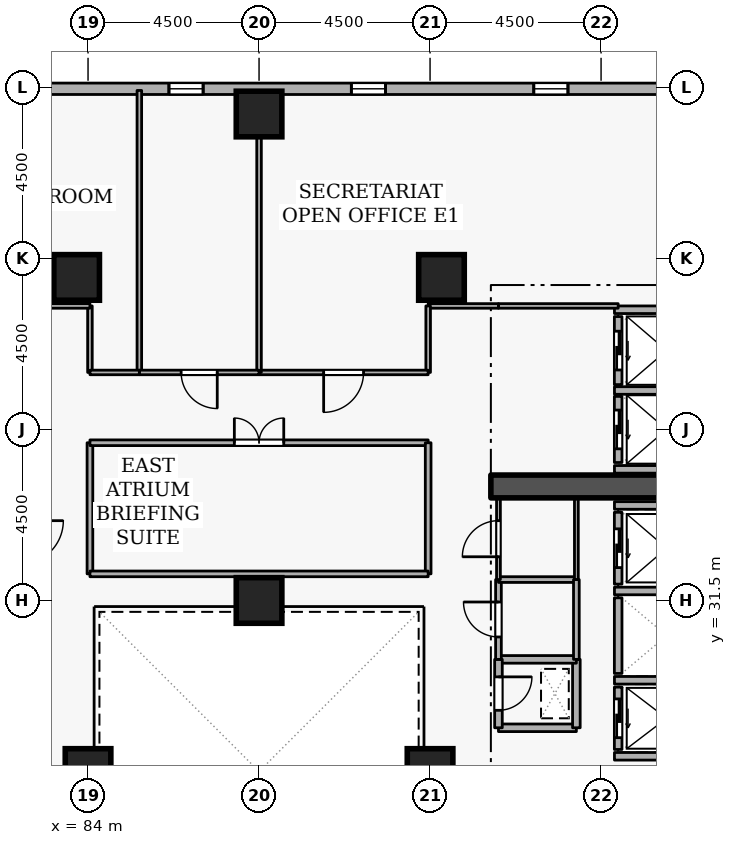
"""IFC4 building model, lengths in metres.
Left out: names, types, materials, properties, quantities, classifications, styles, units other than length and angle.
Written with IfcOpenShell. Run it as: python <this file> out.ifc"""

import sys

from ifc_helpers import new_model, si_unit, direction, frame, frame_2d, origin, origin_2d, place, context, subcontext, project, spatial, rectangle, extrude, element, fill, save


model = new_model("IFC4")
c1 = context("Model", 3, precision=1e-05, world=origin(), true_north=direction((0.0, 1.0)))
c2 = subcontext(c1, "Body", "Model", "MODEL_VIEW")
j1 = project(units=[si_unit("LENGTHUNIT", "METRE"), si_unit("PLANEANGLEUNIT", "RADIAN")], contexts=[c1])
p1 = place(None, origin())
s1 = spatial("IfcSite", under=j1, at=p1, CompositionType="ELEMENT")
p2 = place(p1, origin())
s2 = spatial("IfcBuilding", under=s1, at=p2, CompositionType="ELEMENT")
p3 = place(p2, frame((0.0, 0.0, 108.9)))
s3 = spatial("IfcBuildingStorey", under=s2, at=p3, CompositionType="ELEMENT", Elevation=108.9)
p4 = place(p3, frame((94.6, 34.5, 0.0), z_axis=(0.0, 0.0, 1.0), x_axis=(1.0, 0.0, 0.0)))
e1 = element("IfcWall", 1, at=p4, inside=s3, PredefinedType="SHEAR", context=c2, shape_type="SweptSolid", body=[
    extrude(rectangle(XDim=5.7, YDim=0.6, at=frame_2d((2.85, 0.0))), origin(), (0.0, 0.0, 1.0), 3.6),
])
for number, where, z_axis, x_axis in (
    (2, (88.5, 44.3, 0.0), (0.0, 0.0, 1.0), (1.0, 0.0, 0.0)),
    (3, (93.3, 40.0, 0.0), (0.0, 0.0, 1.0), (1.0, 0.0, 0.0)),
    (4, (83.7, 40.0, 0.0), (0.0, 0.0, 1.0), (1.0, 0.0, 0.0)),
    (5, (93.0, 27.0, 0.0), (0.0, 0.0, 1.0), (1.0, 0.0, 0.0)),
    (6, (84.0, 27.0, 0.0), (0.0, 0.0, 1.0), (1.0, 0.0, 0.0)),
    (7, (88.5, 31.5, 0.0), (0.0, 0.0, 1.0), (1.0, 0.0, 0.0)),
):
    element("IfcColumn", number, at=place(p3, frame(where, z_axis=z_axis, x_axis=x_axis)), inside=s3, PredefinedType="COLUMN", context=c2, shape_type="SweptSolid", body=[
        extrude(rectangle(XDim=1.2, YDim=1.2, at=origin_2d()), origin(), (0.0, 0.0, 1.0), 3.6),
    ])
p5 = place(p3, frame((103.229, 44.963, 0.0), z_axis=(0.0, 0.0, 1.0), x_axis=(-0.999999998537, 5.4088042e-05, 0.0)))
e8 = element("IfcWall", 8, at=p5, inside=s3, PredefinedType="STANDARD", context=c2, shape_type="SweptSolid", body=[
    extrude(rectangle(XDim=36.11, YDim=0.3, at=frame_2d((18.055, 0.0))), origin(), (0.0, 0.0, 1.0), 2.7),
])
p6 = place(p5, frame((6.6, 0.0, 0.72)))
e9 = element("IfcOpeningElement", 9, at=p6, cuts=e8, PredefinedType="OPENING", context=c2, shape_type="SweptSolid", body=[
    extrude(rectangle(XDim=0.9, YDim=1.75, at=frame_2d((0.45, 0.875))), frame((0.0, 0.16, 0.0), z_axis=(0.0, -1.0, 0.0), x_axis=(1.0, 0.0, 0.0)), (0.0, 0.0, 1.0), 0.32),
])
p7 = place(p5, frame((11.4, 0.0, 0.72)))
e10 = element("IfcOpeningElement", 10, at=p7, cuts=e8, PredefinedType="OPENING", context=c2, shape_type="SweptSolid", body=[
    extrude(rectangle(XDim=0.9, YDim=1.75, at=frame_2d((0.45, 0.875))), frame((0.0, 0.16, 0.0), z_axis=(0.0, -1.0, 0.0), x_axis=(1.0, 0.0, 0.0)), (0.0, 0.0, 1.0), 0.32),
])
p8 = place(p5, frame((16.2, 0.0, 0.72)))
e11 = element("IfcOpeningElement", 11, at=p8, cuts=e8, PredefinedType="OPENING", context=c2, shape_type="SweptSolid", body=[
    extrude(rectangle(XDim=0.9, YDim=1.75, at=frame_2d((0.45, 0.875))), frame((0.0, 0.16, 0.0), z_axis=(0.0, -1.0, 0.0), x_axis=(1.0, 0.0, 0.0)), (0.0, 0.0, 1.0), 0.32),
])
p9 = place(p5, frame((21.0, 0.0, 0.72)))
e12 = element("IfcOpeningElement", 12, at=p9, cuts=e8, PredefinedType="OPENING", context=c2, shape_type="SweptSolid", body=[
    extrude(rectangle(XDim=0.9, YDim=1.75, at=frame_2d((0.45, 0.875))), frame((0.0, 0.16, 0.0), z_axis=(0.0, -1.0, 0.0), x_axis=(1.0, 0.0, 0.0)), (0.0, 0.0, 1.0), 0.32),
])
p10 = place(p5, frame((30.6, 0.0, 0.72)))
e13 = element("IfcOpeningElement", 13, at=p10, cuts=e8, PredefinedType="OPENING", context=c2, shape_type="SweptSolid", body=[
    extrude(rectangle(XDim=0.9, YDim=1.75, at=frame_2d((0.45, 0.875))), frame((0.0, 0.16, 0.0), z_axis=(0.0, -1.0, 0.0), x_axis=(1.0, 0.0, 0.0)), (0.0, 0.0, 1.0), 0.32),
])
p11 = place(p3, frame((97.95, 29.22, 0.0), z_axis=(0.0, 0.0, 1.0), x_axis=(0.0, -1.0, 0.0)))
e14 = element("IfcWall", 14, at=p11, inside=s3, PredefinedType="STANDARD", context=c2, shape_type="SweptSolid", body=[
    extrude(rectangle(XDim=1.64, YDim=0.2, at=frame_2d((0.82, 0.0))), origin(), (0.0, 0.0, 1.0), 3.34),
])
p12 = place(p11, frame((0.31, 0.0, 0.0)))
e15 = element("IfcOpeningElement", 15, at=p12, cuts=e14, PredefinedType="OPENING", context=c2, shape_type="SweptSolid", body=[
    extrude(rectangle(XDim=1.02, YDim=2.06, at=frame_2d((0.51, 1.03))), frame((0.0, 0.11, 0.0), z_axis=(0.0, -1.0, 0.0), x_axis=(1.0, 0.0, 0.0)), (0.0, 0.0, 1.0), 0.22),
])
p13 = place(p3, frame((97.95, 31.57, 0.0), z_axis=(0.0, 0.0, 1.0), x_axis=(0.0, -1.0, 0.0)))
e16 = element("IfcWall", 16, at=p13, inside=s3, PredefinedType="STANDARD", context=c2, shape_type="SweptSolid", body=[
    extrude(rectangle(XDim=1.99, YDim=0.2, at=frame_2d((0.995, 0.0))), origin(), (0.0, 0.0, 1.0), 3.34),
])
p14 = place(p3, frame((97.95, 33.82, 0.0), z_axis=(0.0, 0.0, 1.0), x_axis=(0.0, -1.0, 0.0)))
e17 = element("IfcWall", 17, at=p14, inside=s3, PredefinedType="STANDARD", context=c2, shape_type="SweptSolid", body=[
    extrude(rectangle(XDim=1.89, YDim=0.2, at=frame_2d((0.945, 0.0))), origin(), (0.0, 0.0, 1.0), 3.34),
])
p15 = place(p14, frame((0.435, 0.0, 0.0)))
e18 = element("IfcOpeningElement", 18, at=p15, cuts=e17, PredefinedType="OPENING", context=c2, shape_type="SweptSolid", body=[
    extrude(rectangle(XDim=1.02, YDim=2.06, at=frame_2d((0.51, 1.03))), frame((0.0, 0.11, 0.0), z_axis=(0.0, -1.0, 0.0), x_axis=(1.0, 0.0, 0.0)), (0.0, 0.0, 1.0), 0.22),
])
p16 = place(p3, frame((97.95, 36.87, 0.0), z_axis=(0.0, 0.0, 1.0), x_axis=(0.0, -1.0, 0.0)))
e19 = element("IfcWall", 19, at=p16, inside=s3, PredefinedType="STANDARD", context=c2, shape_type="SweptSolid", body=[
    extrude(rectangle(XDim=1.74, YDim=0.2, at=frame_2d((0.87, 0.0))), origin(), (0.0, 0.0, 1.0), 3.34),
])
p17 = place(p16, frame((0.36, 0.0, 0.0)))
e20 = element("IfcOpeningElement", 20, at=p17, cuts=e19, PredefinedType="OPENING", context=c2, shape_type="SweptSolid", body=[
    extrude(rectangle(XDim=1.02, YDim=2.06, at=frame_2d((0.51, 1.03))), frame((0.0, 0.11, 0.0), z_axis=(0.0, -1.0, 0.0), x_axis=(1.0, 0.0, 0.0)), (0.0, 0.0, 1.0), 0.22),
])
p18 = place(p3, frame((97.95, 38.97, 0.0), z_axis=(0.0, 0.0, 1.0), x_axis=(0.0, -1.0, 0.0)))
e21 = element("IfcWall", 21, at=p18, inside=s3, PredefinedType="STANDARD", context=c2, shape_type="SweptSolid", body=[
    extrude(rectangle(XDim=1.79, YDim=0.2, at=frame_2d((0.895, 0.0))), origin(), (0.0, 0.0, 1.0), 3.34),
])
p19 = place(p18, frame((0.385, 0.0, 0.0)))
e22 = element("IfcOpeningElement", 22, at=p19, cuts=e21, PredefinedType="OPENING", context=c2, shape_type="SweptSolid", body=[
    extrude(rectangle(XDim=1.02, YDim=2.06, at=frame_2d((0.51, 1.03))), frame((0.0, 0.11, 0.0), z_axis=(0.0, -1.0, 0.0), x_axis=(1.0, 0.0, 0.0)), (0.0, 0.0, 1.0), 0.22),
])
for number, where, z_axis, x_axis in (
    (23, (97.852, 29.4, 0.0), (0.0, 0.0, 1.0), (1.0, 0.0, 0.0)),
    (24, (97.852, 27.4, 0.0), (0.0, 0.0, 1.0), (1.0, 0.0, 0.0)),
    (25, (97.852, 31.75, 0.0), (0.0, 0.0, 1.0), (1.0, 0.0, 0.0)),
    (26, (97.852, 34.0, 0.0), (0.0, 0.0, 1.0), (1.0, 0.0, 0.0)),
):
    element("IfcWall", number, at=place(p3, frame(where, z_axis=z_axis, x_axis=x_axis)), inside=s3, PredefinedType="STANDARD", context=c2, shape_type="SweptSolid", body=[
        extrude(rectangle(XDim=2.436, YDim=0.2, at=frame_2d((1.218, 0.0))), origin(), (0.0, 0.0, 1.0), 3.34),
    ])
for number, where, z_axis, x_axis in (
    (27, (97.852, 37.025, 0.0), (0.0, 0.0, 1.0), (1.0, 0.0, 0.0)),
    (28, (97.852, 34.95, 0.0), (0.0, 0.0, 1.0), (1.0, 0.0, 0.0)),
):
    element("IfcWall", number, at=place(p3, frame(where, z_axis=z_axis, x_axis=x_axis)), inside=s3, PredefinedType="STANDARD", context=c2, shape_type="SweptSolid", body=[
        extrude(rectangle(XDim=2.746, YDim=0.2, at=frame_2d((1.373, 0.0))), origin(), (0.0, 0.0, 1.0), 3.34),
    ])
p20 = place(p3, frame((97.852, 39.15, 0.0), z_axis=(0.0, 0.0, 1.0), x_axis=(1.0, 0.0, 0.0)))
e29 = element("IfcWall", 29, at=p20, inside=s3, PredefinedType="STANDARD", context=c2, shape_type="SweptSolid", body=[
    extrude(rectangle(XDim=2.636, YDim=0.2, at=frame_2d((1.318, 0.0))), origin(), (0.0, 0.0, 1.0), 3.34),
])
p21 = place(p3, frame((94.8, 28.15, 0.0), z_axis=(0.0, 0.0, 1.0), x_axis=(1.0, 0.0, 0.0)))
e30 = element("IfcWall", 30, at=p21, inside=s3, PredefinedType="STANDARD", context=c2, shape_type="SweptSolid", body=[
    extrude(rectangle(XDim=2.05, YDim=0.2, at=frame_2d((1.025, 0.0))), origin(), (0.0, 0.0, 1.0), 3.34),
])
p22 = place(p3, frame((96.85, 28.15, 0.0), z_axis=(0.0, 0.0, 1.0), x_axis=(0.0, 1.0, 0.0)))
e31 = element("IfcWall", 31, at=p22, inside=s3, PredefinedType="STANDARD", context=c2, shape_type="SweptSolid", body=[
    extrude(rectangle(XDim=1.8, YDim=0.2, at=frame_2d((0.9, 0.0))), origin(), (0.0, 0.0, 1.0), 3.34),
])
p23 = place(p3, frame((96.85, 29.95, 0.0), z_axis=(0.0, 0.0, 1.0), x_axis=(-1.0, 0.0, 0.0)))
e32 = element("IfcWall", 32, at=p23, inside=s3, PredefinedType="STANDARD", context=c2, shape_type="SweptSolid", body=[
    extrude(rectangle(XDim=2.05, YDim=0.2, at=frame_2d((1.025, 0.0))), origin(), (0.0, 0.0, 1.0), 3.34),
])
p24 = place(p3, frame((94.8, 29.95, 0.0), z_axis=(0.0, 0.0, 1.0), x_axis=(0.0, -1.0, 0.0)))
e33 = element("IfcWall", 33, at=p24, inside=s3, PredefinedType="STANDARD", context=c2, shape_type="SweptSolid", body=[
    extrude(rectangle(XDim=1.8, YDim=0.2, at=frame_2d((0.9, 0.0))), origin(), (0.0, 0.0, 1.0), 3.34),
])
p25 = place(p24, frame((0.46, 0.0, 0.0)))
e34 = element("IfcOpeningElement", 34, at=p25, cuts=e33, PredefinedType="OPENING", context=c2, shape_type="SweptSolid", body=[
    extrude(rectangle(XDim=0.88, YDim=2.04, at=frame_2d((0.44, 1.02))), frame((0.0, 0.11, 0.0), z_axis=(0.0, -1.0, 0.0), x_axis=(1.0, 0.0, 0.0)), (0.0, 0.0, 1.0), 0.22),
])
p26 = place(p3, frame((94.8, 29.95, 0.0), z_axis=(0.0, 0.0, 1.0), x_axis=(0.0, 1.0, 0.0)))
e35 = element("IfcWall", 35, at=p26, inside=s3, PredefinedType="PARTITIONING", context=c2, shape_type="SweptSolid", body=[
    extrude(rectangle(XDim=2.1, YDim=0.15, at=frame_2d((1.05, 0.0))), origin(), (0.0, 0.0, 1.0), 3.34),
])
p27 = place(p26, frame((0.59, 0.0, 0.0)))
e36 = element("IfcOpeningElement", 36, at=p27, cuts=e35, PredefinedType="OPENING", context=c2, shape_type="SweptSolid", body=[
    extrude(rectangle(XDim=0.92, YDim=2.08, at=frame_2d((0.46, 1.04))), frame((0.0, 0.085, 0.0), z_axis=(0.0, -1.0, 0.0), x_axis=(1.0, 0.0, 0.0)), (0.0, 0.0, 1.0), 0.17),
])
p28 = place(p3, frame((94.8, 32.05, 0.0), z_axis=(0.0, 0.0, 1.0), x_axis=(1.0, 0.0, 0.0)))
e37 = element("IfcWall", 37, at=p28, inside=s3, PredefinedType="PARTITIONING", context=c2, shape_type="SweptSolid", body=[
    extrude(rectangle(XDim=2.05, YDim=0.15, at=frame_2d((1.025, 0.0))), origin(), (0.0, 0.0, 1.0), 3.34),
])
p29 = place(p3, frame((96.85, 32.05, 0.0), z_axis=(0.0, 0.0, 1.0), x_axis=(0.0, -1.0, 0.0)))
e38 = element("IfcWall", 38, at=p29, inside=s3, PredefinedType="PARTITIONING", context=c2, shape_type="SweptSolid", body=[
    extrude(rectangle(XDim=2.1, YDim=0.15, at=frame_2d((1.05, 0.0))), origin(), (0.0, 0.0, 1.0), 3.34),
])
p30 = place(p3, frame((94.8, 32.05, 0.0), z_axis=(0.0, 0.0, 1.0), x_axis=(0.0, 1.0, 0.0)))
e39 = element("IfcWall", 39, at=p30, inside=s3, PredefinedType="PARTITIONING", context=c2, shape_type="SweptSolid", body=[
    extrude(rectangle(XDim=2.15, YDim=0.1, at=frame_2d((1.075, 0.0))), origin(), (0.0, 0.0, 1.0), 3.34),
])
p31 = place(p30, frame((0.6, 0.0, 0.0)))
e40 = element("IfcOpeningElement", 40, at=p31, cuts=e39, PredefinedType="OPENING", context=c2, shape_type="SweptSolid", body=[
    extrude(rectangle(XDim=0.95, YDim=2.1, at=frame_2d((0.475, 1.05))), frame((0.0, 0.06, 0.0), z_axis=(0.0, -1.0, 0.0), x_axis=(1.0, 0.0, 0.0)), (0.0, 0.0, 1.0), 0.12),
])
p32 = place(p3, frame((96.85, 34.2, 0.0), z_axis=(0.0, 0.0, 1.0), x_axis=(0.0, -1.0, 0.0)))
e41 = element("IfcWall", 41, at=p32, inside=s3, PredefinedType="PARTITIONING", context=c2, shape_type="SweptSolid", body=[
    extrude(rectangle(XDim=2.15, YDim=0.1, at=frame_2d((1.075, 0.0))), origin(), (0.0, 0.0, 1.0), 3.34),
])
p33 = place(p3, frame((97.95, 39.25, 0.0), z_axis=(0.0, 0.0, 1.0), x_axis=(-1.0, 0.0, 0.0)))
e42 = element("IfcWall", 42, at=p33, inside=s3, PredefinedType="PARTITIONING", context=c2, shape_type="SweptSolid", body=[
    extrude(rectangle(XDim=3.15, YDim=0.12, at=frame_2d((1.575, 0.0))), origin(), (0.0, 0.0, 1.0), 3.34),
])
p34 = place(p3, frame((94.8, 39.25, 0.0), z_axis=(0.0, 0.0, 1.0), x_axis=(-1.0, 0.0, 0.0)))
e43 = element("IfcWall", 43, at=p34, inside=s3, PredefinedType="PARTITIONING", context=c2, shape_type="SweptSolid", body=[
    extrude(rectangle(XDim=1.85, YDim=0.12, at=frame_2d((0.925, 0.0))), origin(), (0.0, 0.0, 1.0), 3.34),
])
p35 = place(p3, frame((92.95, 39.25, 0.0), z_axis=(0.0, 0.0, 1.0), x_axis=(0.0, -1.0, 0.0)))
e44 = element("IfcWall", 44, at=p35, inside=s3, PredefinedType="PARTITIONING", context=c2, shape_type="SweptSolid", body=[
    extrude(rectangle(XDim=1.75, YDim=0.12, at=frame_2d((0.875, 0.0))), origin(), (0.0, 0.0, 1.0), 3.34),
])
p36 = place(p3, frame((92.95, 37.5, 0.0), z_axis=(0.0, 0.0, 1.0), x_axis=(-1.0, 0.0, 0.0)))
e45 = element("IfcWall", 45, at=p36, inside=s3, PredefinedType="PARTITIONING", context=c2, shape_type="SweptSolid", body=[
    extrude(rectangle(XDim=4.45, YDim=0.12, at=frame_2d((2.225, 0.0))), origin(), (0.0, 0.0, 1.0), 3.34),
])
p37 = place(p36, frame((1.7, 0.0, 0.0)))
e46 = element("IfcOpeningElement", 46, at=p37, cuts=e45, PredefinedType="OPENING", context=c2, shape_type="SweptSolid", body=[
    extrude(rectangle(XDim=1.05, YDim=2.1, at=frame_2d((0.525, 1.05))), frame((0.0, 0.07, 0.0), z_axis=(0.0, -1.0, 0.0), x_axis=(1.0, 0.0, 0.0)), (0.0, 0.0, 1.0), 0.14),
])
p38 = place(p3, frame((88.5, 37.5, 0.0), z_axis=(0.0, 0.0, 1.0), x_axis=(0.0, 1.0, 0.0)))
e47 = element("IfcWall", 47, at=p38, inside=s3, PredefinedType="PARTITIONING", context=c2, shape_type="SweptSolid", body=[
    extrude(rectangle(XDim=7.42, YDim=0.12, at=frame_2d((3.71, 0.0))), origin(), (0.0, 0.0, 1.0), 2.882),
])
p39 = place(p3, frame((85.35, 37.5, 0.0), z_axis=(0.0, 0.0, 1.0), x_axis=(0.0, 1.0, 0.0)))
e48 = element("IfcWall", 48, at=p39, inside=s3, PredefinedType="PARTITIONING", context=c2, shape_type="SweptSolid", body=[
    extrude(rectangle(XDim=7.42, YDim=0.12, at=frame_2d((3.71, 0.0))), origin(), (0.0, 0.0, 1.0), 3.34),
])
p40 = place(p3, frame((88.5, 37.5, 0.0), z_axis=(0.0, 0.0, 1.0), x_axis=(-1.0, 0.0, 0.0)))
e49 = element("IfcWall", 49, at=p40, inside=s3, PredefinedType="PARTITIONING", context=c2, shape_type="SweptSolid", body=[
    extrude(rectangle(XDim=3.15, YDim=0.12, at=frame_2d((1.575, 0.0))), origin(), (0.0, 0.0, 1.0), 3.34),
])
p41 = place(p40, frame((1.1, 0.0, 0.0)))
e50 = element("IfcOpeningElement", 50, at=p41, cuts=e49, PredefinedType="OPENING", context=c2, shape_type="SweptSolid", body=[
    extrude(rectangle(XDim=0.95, YDim=2.1, at=frame_2d((0.475, 1.05))), frame((0.0, 0.07, 0.0), z_axis=(0.0, -1.0, 0.0), x_axis=(1.0, 0.0, 0.0)), (0.0, 0.0, 1.0), 0.14),
])
p42 = place(p3, frame((84.05, 37.5, 0.0), z_axis=(0.0, 0.0, 1.0), x_axis=(0.0, 1.0, 0.0)))
e51 = element("IfcWall", 51, at=p42, inside=s3, PredefinedType="PARTITIONING", context=c2, shape_type="SweptSolid", body=[
    extrude(rectangle(XDim=1.75, YDim=0.12, at=frame_2d((0.875, 0.0))), origin(), (0.0, 0.0, 1.0), 3.34),
])
p43 = place(p3, frame((84.05, 39.25, 0.0), z_axis=(0.0, 0.0, 1.0), x_axis=(-1.0, 0.0, 0.0)))
e52 = element("IfcWall", 52, at=p43, inside=s3, PredefinedType="PARTITIONING", context=c2, shape_type="SweptSolid", body=[
    extrude(rectangle(XDim=1.85, YDim=0.12, at=frame_2d((0.925, 0.0))), origin(), (0.0, 0.0, 1.0), 3.34),
])
p44 = place(p3, frame((85.35, 37.5, 0.0), z_axis=(0.0, 0.0, 1.0), x_axis=(-1.0, 0.0, 0.0)))
e53 = element("IfcWall", 53, at=p44, inside=s3, PredefinedType="PARTITIONING", context=c2, shape_type="SweptSolid", body=[
    extrude(rectangle(XDim=1.3, YDim=0.12, at=frame_2d((0.65, 0.0))), origin(), (0.0, 0.0, 1.0), 3.34),
])
p45 = place(p3, frame((84.05, 32.2, 0.0), z_axis=(0.0, 0.0, 1.0), x_axis=(0.0, 1.0, 0.0)))
e54 = element("IfcWall", 54, at=p45, inside=s3, PredefinedType="PARTITIONING", context=c2, shape_type="SweptSolid", body=[
    extrude(rectangle(XDim=3.45, YDim=0.15, at=frame_2d((1.725, 0.0))), origin(), (0.0, 0.0, 1.0), 3.34),
])
p46 = place(p3, frame((84.05, 35.65, 0.0), z_axis=(0.0, 0.0, 1.0), x_axis=(1.0, 0.0, 0.0)))
e55 = element("IfcWall", 55, at=p46, inside=s3, PredefinedType="PARTITIONING", context=c2, shape_type="SweptSolid", body=[
    extrude(rectangle(XDim=8.9, YDim=0.15, at=frame_2d((4.45, 0.0))), origin(), (0.0, 0.0, 1.0), 3.34),
])
p47 = place(p46, frame((3.8, 0.0, 0.0)))
e56 = element("IfcOpeningElement", 56, at=p47, cuts=e55, PredefinedType="OPENING", context=c2, shape_type="SweptSolid", body=[
    extrude(rectangle(XDim=1.3, YDim=2.12, at=frame_2d((0.65, 1.06))), frame((0.0, 0.085, 0.0), z_axis=(0.0, -1.0, 0.0), x_axis=(1.0, 0.0, 0.0)), (0.0, 0.0, 1.0), 0.17),
])
p48 = place(p3, frame((92.95, 35.65, 0.0), z_axis=(0.0, 0.0, 1.0), x_axis=(0.0, -1.0, 0.0)))
e57 = element("IfcWall", 57, at=p48, inside=s3, PredefinedType="PARTITIONING", context=c2, shape_type="SweptSolid", body=[
    extrude(rectangle(XDim=3.45, YDim=0.15, at=frame_2d((1.725, 0.0))), origin(), (0.0, 0.0, 1.0), 3.34),
])
p49 = place(p3, frame((92.95, 32.2, 0.0), z_axis=(0.0, 0.0, 1.0), x_axis=(-1.0, 0.0, 0.0)))
e58 = element("IfcWall", 58, at=p49, inside=s3, PredefinedType="PARTITIONING", context=c2, shape_type="SweptSolid", body=[
    extrude(rectangle(XDim=8.9, YDim=0.15, at=frame_2d((4.45, 0.0))), origin(), (0.0, 0.0, 1.0), 3.34),
])
p50 = place(p6, origin())
e59 = element("IfcWindow", 59, at=p50, inside=s3, PartitioningType="SINGLE_PANEL", PredefinedType="WINDOW", context=c2, shape_type="SweptSolid", body=[
    extrude(rectangle(XDim=0.9, YDim=1.75, at=frame_2d((0.45, 0.875))), frame((0.0, 0.03, 0.0), z_axis=(0.0, -1.0, 0.0), x_axis=(1.0, 0.0, 0.0)), (0.0, 0.0, 1.0), 0.06),
])
fill(e9, e59)
p51 = place(p7, origin())
e60 = element("IfcWindow", 60, at=p51, inside=s3, PartitioningType="SINGLE_PANEL", PredefinedType="WINDOW", context=c2, shape_type="SweptSolid", body=[
    extrude(rectangle(XDim=0.9, YDim=1.75, at=frame_2d((0.45, 0.875))), frame((0.0, 0.03, 0.0), z_axis=(0.0, -1.0, 0.0), x_axis=(1.0, 0.0, 0.0)), (0.0, 0.0, 1.0), 0.06),
])
fill(e10, e60)
p52 = place(p8, origin())
e61 = element("IfcWindow", 61, at=p52, inside=s3, PartitioningType="SINGLE_PANEL", PredefinedType="WINDOW", context=c2, shape_type="SweptSolid", body=[
    extrude(rectangle(XDim=0.9, YDim=1.75, at=frame_2d((0.45, 0.875))), frame((0.0, 0.03, 0.0), z_axis=(0.0, -1.0, 0.0), x_axis=(1.0, 0.0, 0.0)), (0.0, 0.0, 1.0), 0.06),
])
fill(e11, e61)
p53 = place(p12, origin())
e62 = element("IfcDoor", 62, at=p53, inside=s3, OperationType="SLIDING_TO_LEFT", PredefinedType="DOOR", context=c2, shape_type="SweptSolid", body=[
    extrude(rectangle(XDim=1.02, YDim=2.06, at=frame_2d((0.51, 1.03))), frame((0.0, 0.025, 0.0), z_axis=(0.0, -1.0, 0.0), x_axis=(1.0, 0.0, 0.0)), (0.0, 0.0, 1.0), 0.05),
])
fill(e15, e62)
p54 = place(p15, origin())
e63 = element("IfcDoor", 63, at=p54, inside=s3, OperationType="SLIDING_TO_LEFT", PredefinedType="DOOR", context=c2, shape_type="SweptSolid", body=[
    extrude(rectangle(XDim=1.02, YDim=2.06, at=frame_2d((0.51, 1.03))), frame((0.0, 0.025, 0.0), z_axis=(0.0, -1.0, 0.0), x_axis=(1.0, 0.0, 0.0)), (0.0, 0.0, 1.0), 0.05),
])
fill(e18, e63)
p55 = place(p17, origin())
e64 = element("IfcDoor", 64, at=p55, inside=s3, OperationType="SLIDING_TO_LEFT", PredefinedType="DOOR", context=c2, shape_type="SweptSolid", body=[
    extrude(rectangle(XDim=1.02, YDim=2.06, at=frame_2d((0.51, 1.03))), frame((0.0, 0.025, 0.0), z_axis=(0.0, -1.0, 0.0), x_axis=(1.0, 0.0, 0.0)), (0.0, 0.0, 1.0), 0.05),
])
fill(e20, e64)
p56 = place(p19, origin())
e65 = element("IfcDoor", 65, at=p56, inside=s3, OperationType="SLIDING_TO_LEFT", PredefinedType="DOOR", context=c2, shape_type="SweptSolid", body=[
    extrude(rectangle(XDim=1.02, YDim=2.06, at=frame_2d((0.51, 1.03))), frame((0.0, 0.025, 0.0), z_axis=(0.0, -1.0, 0.0), x_axis=(1.0, 0.0, 0.0)), (0.0, 0.0, 1.0), 0.05),
])
fill(e22, e65)
p57 = place(p25, origin())
e66 = element("IfcDoor", 66, at=p57, inside=s3, OperationType="SINGLE_SWING_LEFT", PredefinedType="DOOR", context=c2, shape_type="SweptSolid", body=[
    extrude(rectangle(XDim=0.88, YDim=2.04, at=frame_2d((0.44, 1.02))), frame((0.0, 0.025, 0.0), z_axis=(0.0, -1.0, 0.0), x_axis=(1.0, 0.0, 0.0)), (0.0, 0.0, 1.0), 0.05),
])
fill(e34, e66)
p58 = place(p27, origin())
e67 = element("IfcDoor", 67, at=p58, inside=s3, OperationType="SINGLE_SWING_RIGHT", PredefinedType="DOOR", context=c2, shape_type="SweptSolid", body=[
    extrude(rectangle(XDim=0.92, YDim=2.08, at=frame_2d((0.46, 1.04))), frame((0.0, 0.025, 0.0), z_axis=(0.0, -1.0, 0.0), x_axis=(1.0, 0.0, 0.0)), (0.0, 0.0, 1.0), 0.05),
])
fill(e36, e67)
p59 = place(p31, origin())
e68 = element("IfcDoor", 68, at=p59, inside=s3, OperationType="SINGLE_SWING_LEFT", PredefinedType="DOOR", context=c2, shape_type="SweptSolid", body=[
    extrude(rectangle(XDim=0.95, YDim=2.1, at=frame_2d((0.475, 1.05))), frame((0.0, 0.025, 0.0), z_axis=(0.0, -1.0, 0.0), x_axis=(1.0, 0.0, 0.0)), (0.0, 0.0, 1.0), 0.05),
])
fill(e40, e68)
p60 = place(p37, origin())
e69 = element("IfcDoor", 69, at=p60, inside=s3, OperationType="SINGLE_SWING_RIGHT", PredefinedType="DOOR", context=c2, shape_type="SweptSolid", body=[
    extrude(rectangle(XDim=1.05, YDim=2.1, at=frame_2d((0.525, 1.05))), frame((0.0, 0.025, 0.0), z_axis=(0.0, -1.0, 0.0), x_axis=(1.0, 0.0, 0.0)), (0.0, 0.0, 1.0), 0.05),
])
fill(e46, e69)
p61 = place(p41, origin())
e70 = element("IfcDoor", 70, at=p61, inside=s3, OperationType="SINGLE_SWING_LEFT", PredefinedType="DOOR", context=c2, shape_type="SweptSolid", body=[
    extrude(rectangle(XDim=0.95, YDim=2.1, at=frame_2d((0.475, 1.05))), frame((0.0, 0.025, 0.0), z_axis=(0.0, -1.0, 0.0), x_axis=(1.0, 0.0, 0.0)), (0.0, 0.0, 1.0), 0.05),
])
fill(e50, e70)
p62 = place(p47, origin())
e71 = element("IfcDoor", 71, at=p62, inside=s3, OperationType="DOUBLE_DOOR_SINGLE_SWING", PredefinedType="DOOR", context=c2, shape_type="SweptSolid", body=[
    extrude(rectangle(XDim=1.3, YDim=2.12, at=frame_2d((0.65, 1.06))), frame((0.0, 0.025, 0.0), z_axis=(0.0, -1.0, 0.0), x_axis=(1.0, 0.0, 0.0)), (0.0, 0.0, 1.0), 0.05),
])
fill(e56, e71)
save(model, sys.argv[1])
